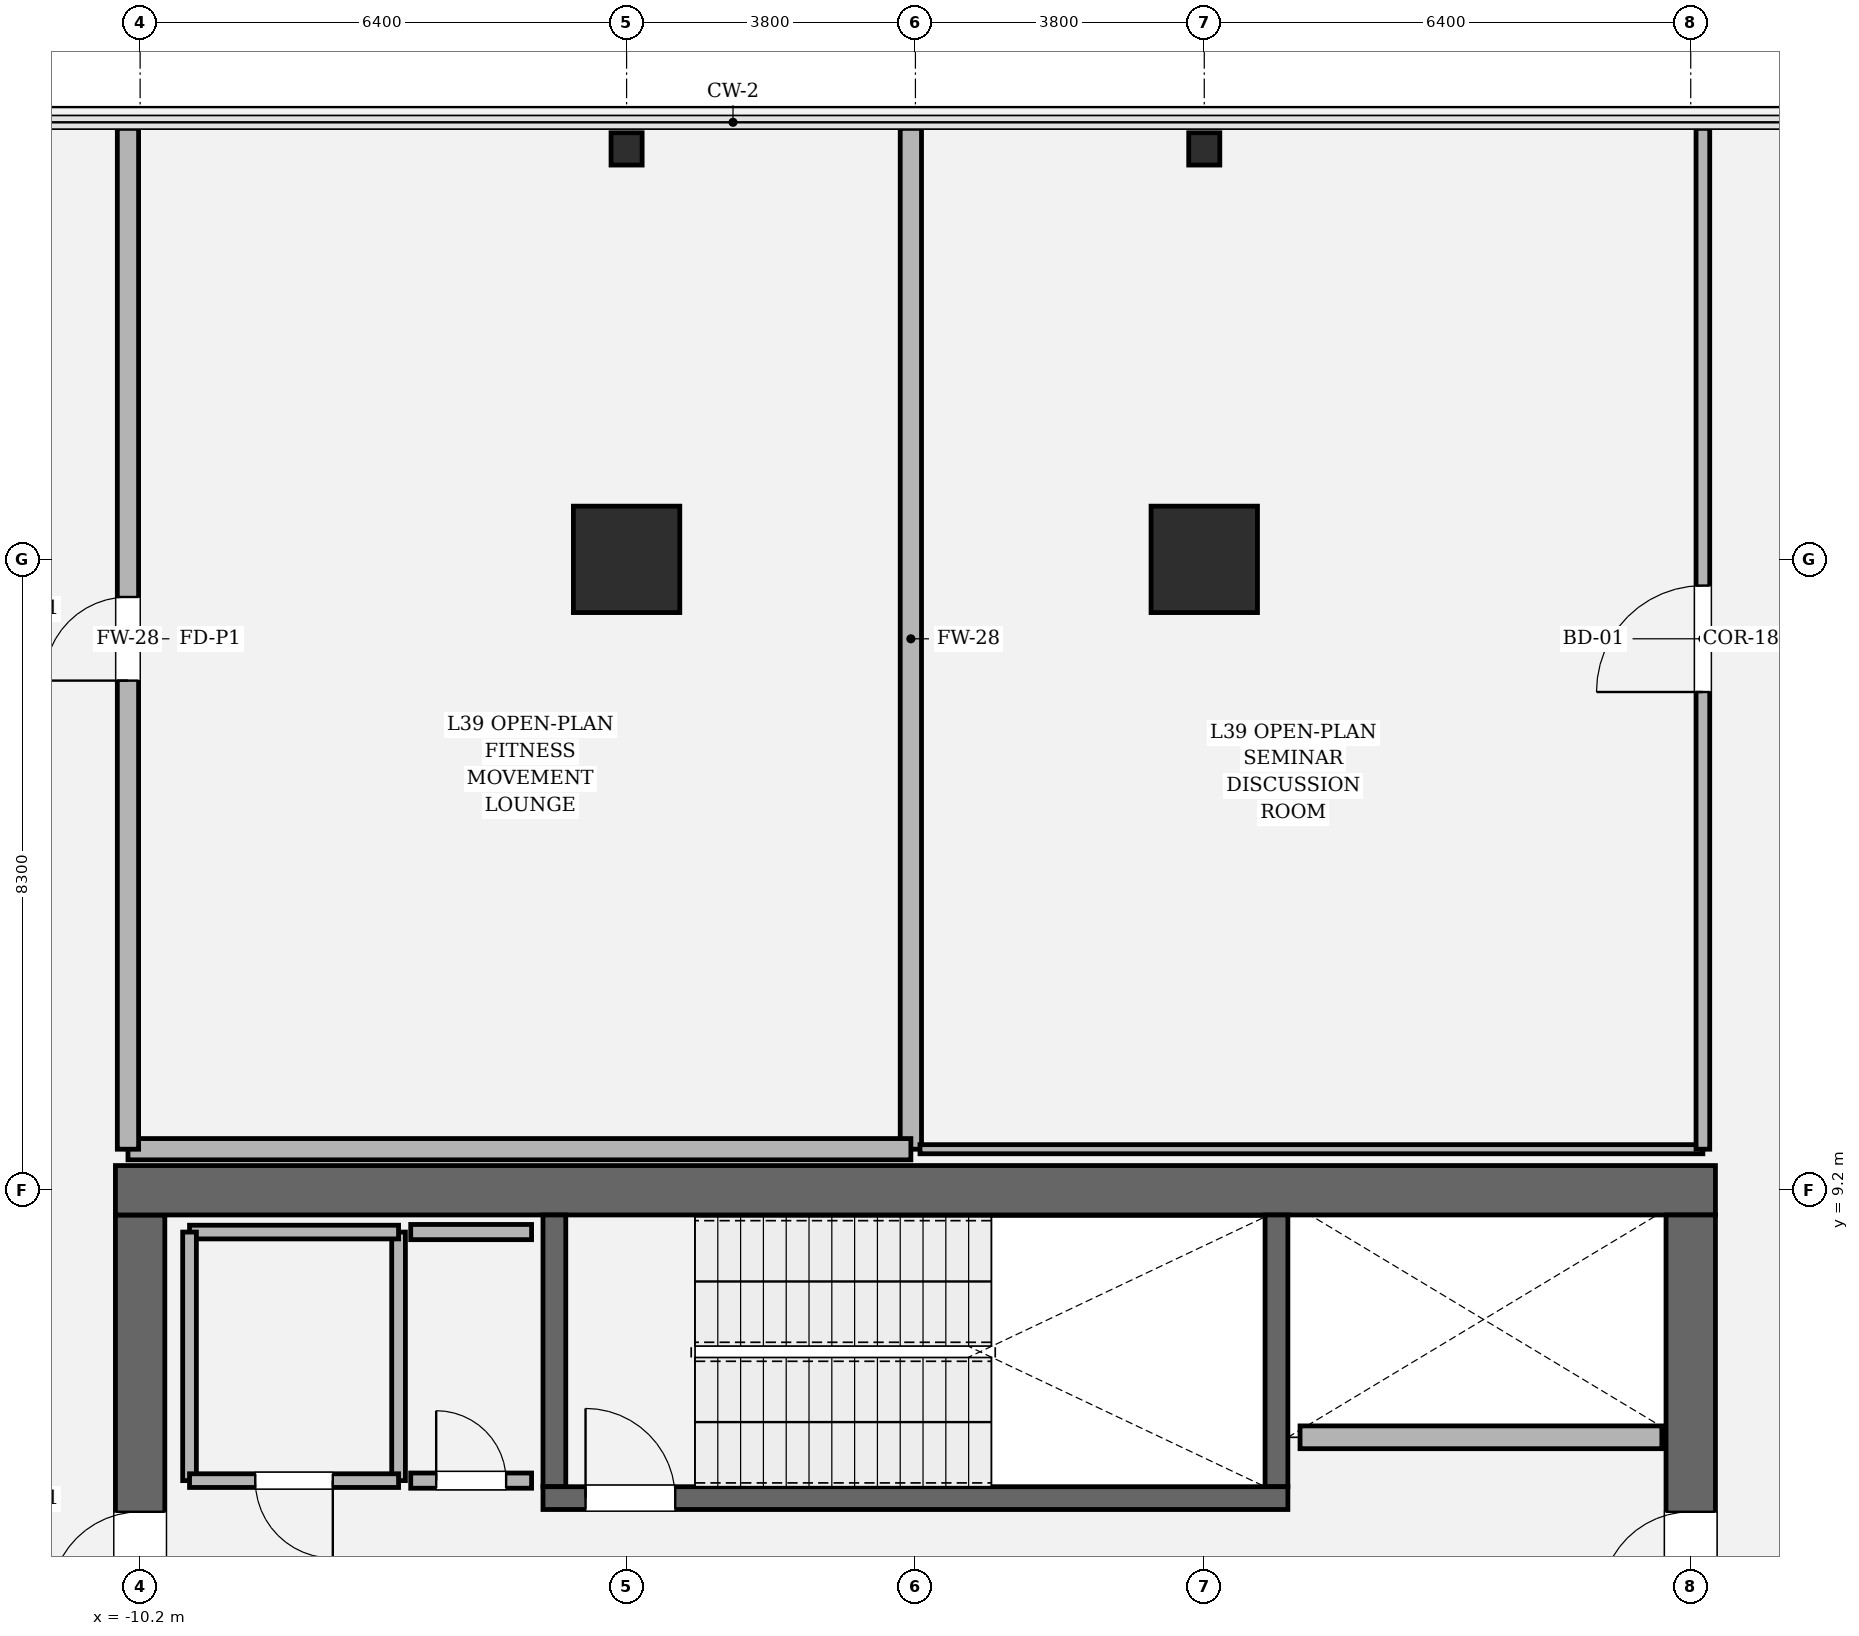
"""IFC4 building model, lengths in metres.
Left out: names, types, materials, properties, quantities, classifications, styles, units other than length and angle.
Written with IfcOpenShell. Run it as: python <this file> out.ifc"""

import sys

from ifc_helpers import new_model, si_unit, direction, frame, frame_2d, origin, origin_2d, place, context, subcontext, project, spatial, rectangle, hollow_rectangle, i_section, extrude, element, fill, save


model = new_model("IFC4")
c1 = context("Model", 3, precision=1e-05, world=origin(), true_north=direction((0.0, 1.0)))
c2 = subcontext(c1, "Body", "Model", "MODEL_VIEW")
j1 = project(units=[si_unit("LENGTHUNIT", "METRE"), si_unit("PLANEANGLEUNIT", "RADIAN")], contexts=[c1])
p1 = place(None, origin())
s1 = spatial("IfcSite", under=j1, at=p1, CompositionType="ELEMENT")
p2 = place(p1, origin())
s2 = spatial("IfcBuilding", under=s1, at=p2, CompositionType="ELEMENT")
p3 = place(p2, frame((0.0, 0.0, 168.15)))
s3 = spatial("IfcBuildingStorey", under=s2, at=p3, CompositionType="ELEMENT", Elevation=168.15)
p4 = place(p3, frame((-10.2, -8.875, 0.0), z_axis=(0.0, 0.0, 1.0), x_axis=(0.0, 1.0, 0.0)))
e1 = element("IfcWall", 1, at=p4, inside=s3, PredefinedType="SHEAR", context=c2, shape_type="SweptSolid", body=[
    extrude(rectangle(XDim=17.75, YDim=0.65, at=frame_2d((8.875, 0.0))), origin(), (0.0, 0.0, 1.0), 4.05),
])
p5 = place(p4, frame((12.665, 0.0, 0.0)))
e2 = element("IfcOpeningElement", 2, at=p5, cuts=e1, PredefinedType="OPENING", context=c2, shape_type="SweptSolid", body=[
    extrude(rectangle(XDim=1.18, YDim=2.2, at=frame_2d((0.59, 1.1))), frame((0.0, 0.335, 0.0), z_axis=(0.0, -1.0, 0.0), x_axis=(1.0, 0.0, 0.0)), (0.0, 0.0, 1.0), 0.67),
])
p6 = place(p3, frame((-10.525, 9.2, 0.0), z_axis=(0.0, 0.0, 1.0), x_axis=(1.0, 0.0, 0.0)))
e3 = element("IfcWall", 3, at=p6, inside=s3, PredefinedType="SHEAR", context=c2, shape_type="SweptSolid", body=[
    extrude(rectangle(XDim=21.05, YDim=0.65, at=frame_2d((10.525, 0.0))), origin(), (0.0, 0.0, 1.0), 4.05),
])
p7 = place(p3, frame((10.2, 8.875, 0.0), z_axis=(0.0, 0.0, 1.0), x_axis=(0.0, -1.0, 0.0)))
e4 = element("IfcWall", 4, at=p7, inside=s3, PredefinedType="SHEAR", context=c2, shape_type="SweptSolid", body=[
    extrude(rectangle(XDim=17.75, YDim=0.65, at=frame_2d((8.875, 0.0))), origin(), (0.0, 0.0, 1.0), 4.05),
])
p8 = place(p7, frame((3.905, 0.0, 0.0)))
e5 = element("IfcOpeningElement", 5, at=p8, cuts=e4, PredefinedType="OPENING", context=c2, shape_type="SweptSolid", body=[
    extrude(rectangle(XDim=1.18, YDim=2.2, at=frame_2d((0.59, 1.1))), frame((0.0, 0.335, 0.0), z_axis=(0.0, -1.0, 0.0), x_axis=(1.0, 0.0, 0.0)), (0.0, 0.0, 1.0), 0.67),
])
for number, where, z_axis, x_axis in (
    (6, (-4.75, 5.3, 0.0), (0.0, 0.0, 1.0), (0.0, 1.0, 0.0)),
    (7, (4.75, 8.875, 0.0), (0.0, 0.0, 1.0), (0.0, -1.0, 0.0)),
):
    element("IfcWall", number, at=place(p3, frame(where, z_axis=z_axis, x_axis=x_axis)), inside=s3, PredefinedType="SOLIDWALL", context=c2, shape_type="SweptSolid", body=[
        extrude(rectangle(XDim=3.575, YDim=0.3, at=frame_2d((1.788, 0.0))), origin(), (0.0, 0.0, 1.0), 4.05),
    ])
p9 = place(p3, frame((-4.9, 5.15, 0.0), z_axis=(0.0, 0.0, 1.0), x_axis=(1.0, 0.0, 0.0)))
e8 = element("IfcWall", 8, at=p9, inside=s3, PredefinedType="SOLIDWALL", context=c2, shape_type="SweptSolid", body=[
    extrude(rectangle(XDim=9.8, YDim=0.3, at=frame_2d((4.9, 0.0))), origin(), (0.0, 0.0, 1.0), 4.05),
])
p10 = place(p9, frame((0.56, 0.0, 0.0)))
e9 = element("IfcOpeningElement", 9, at=p10, cuts=e8, PredefinedType="OPENING", context=c2, shape_type="SweptSolid", body=[
    extrude(rectangle(XDim=1.18, YDim=2.2, at=frame_2d((0.59, 1.1))), frame((0.0, 0.16, 0.0), z_axis=(0.0, -1.0, 0.0), x_axis=(1.0, 0.0, 0.0)), (0.0, 0.0, 1.0), 0.32),
])
for number, where, z_axis, x_axis in (
    (10, (3.8, 17.5, 0.0), (0.0, 0.0, 1.0), (1.0, 0.0, 0.0)),
    (11, (-3.8, 17.5, 0.0), (0.0, 0.0, 1.0), (1.0, 0.0, 0.0)),
):
    element("IfcColumn", number, at=place(p3, frame(where, z_axis=z_axis, x_axis=x_axis)), inside=s3, PredefinedType="COLUMN", context=c2, shape_type="SweptSolid", body=[
        extrude(hollow_rectangle(XDim=1.4, YDim=1.4, WallThickness=0.042, at=origin_2d()), origin(), (0.0, 0.0, 1.0), 4.05),
    ])
for number, where, z_axis, x_axis in (
    (12, (-3.8, 22.9, 0.0), (0.0, 0.0, 1.0), (1.0, 0.0, 0.0)),
    (13, (3.8, 22.9, 0.0), (0.0, 0.0, 1.0), (1.0, 0.0, 0.0)),
):
    element("IfcColumn", number, at=place(p3, frame(where, z_axis=z_axis, x_axis=x_axis)), inside=s3, PredefinedType="COLUMN", context=c2, shape_type="SweptSolid", body=[
        extrude(i_section(OverallWidth=0.409, OverallDepth=0.425, WebThickness=0.032, FlangeThickness=0.052, FilletRadius=0.018, at=origin_2d()), origin(), (0.0, 0.0, 1.0), 4.048),
    ])
p11 = place(p3, frame((5.06, 5.95, 0.0), z_axis=(0.0, 0.0, 1.0), x_axis=(1.0, 0.0, 0.0)))
e14 = element("IfcWall", 14, at=p11, inside=s3, PredefinedType="SOLIDWALL", context=c2, shape_type="SweptSolid", body=[
    extrude(rectangle(XDim=4.76, YDim=0.3, at=frame_2d((2.38, 0.0))), origin(), (0.0, 0.0, 1.0), 3.77),
])
p12 = place(p3, frame((-6.8, 5.38, 0.0), z_axis=(0.0, 0.0, 1.0), x_axis=(0.0, 1.0, 0.0)))
e15 = element("IfcWall", 15, at=p12, inside=s3, PredefinedType="PARTITIONING", context=c2, shape_type="SweptSolid", body=[
    extrude(rectangle(XDim=3.27, YDim=0.18, at=frame_2d((1.635, 0.0))), origin(), (0.0, 0.0, 1.0), 3.77),
])
p13 = place(p3, frame((-6.8, 8.65, 0.0), z_axis=(0.0, 0.0, 1.0), x_axis=(-1.0, 0.0, 0.0)))
e16 = element("IfcWall", 16, at=p13, inside=s3, PredefinedType="PARTITIONING", context=c2, shape_type="SweptSolid", body=[
    extrude(rectangle(XDim=2.75, YDim=0.18, at=frame_2d((1.375, 0.0))), origin(), (0.0, 0.0, 1.0), 3.77),
])
p14 = place(p3, frame((-9.55, 8.65, 0.0), z_axis=(0.0, 0.0, 1.0), x_axis=(0.0, -1.0, 0.0)))
e17 = element("IfcWall", 17, at=p14, inside=s3, PredefinedType="PARTITIONING", context=c2, shape_type="SweptSolid", body=[
    extrude(rectangle(XDim=3.27, YDim=0.18, at=frame_2d((1.635, 0.0))), origin(), (0.0, 0.0, 1.0), 3.77),
])
p15 = place(p3, frame((-9.55, 5.38, 0.0), z_axis=(0.0, 0.0, 1.0), x_axis=(1.0, 0.0, 0.0)))
e18 = element("IfcWall", 18, at=p15, inside=s3, PredefinedType="PARTITIONING", context=c2, shape_type="SweptSolid", body=[
    extrude(rectangle(XDim=2.75, YDim=0.18, at=frame_2d((1.375, 0.0))), origin(), (0.0, 0.0, 1.0), 3.77),
])
p16 = place(p15, frame((0.865, 0.0, 0.0)))
e19 = element("IfcOpeningElement", 19, at=p16, cuts=e18, PredefinedType="OPENING", context=c2, shape_type="SweptSolid", body=[
    extrude(rectangle(XDim=1.02, YDim=2.2, at=frame_2d((0.51, 1.1))), frame((0.0, 0.1, 0.0), z_axis=(0.0, -1.0, 0.0), x_axis=(1.0, 0.0, 0.0)), (0.0, 0.0, 1.0), 0.2),
])
p17 = place(p3, frame((-5.05, 8.65, 0.0), z_axis=(0.0, 0.0, 1.0), x_axis=(-1.0, 0.0, 0.0)))
e20 = element("IfcWall", 20, at=p17, inside=s3, PredefinedType="SOLIDWALL", context=c2, shape_type="SweptSolid", body=[
    extrude(rectangle(XDim=1.59, YDim=0.2, at=frame_2d((0.795, 0.0))), origin(), (0.0, 0.0, 1.0), 3.77),
])
p18 = place(p3, frame((-6.64, 5.38, 0.0), z_axis=(0.0, 0.0, 1.0), x_axis=(1.0, 0.0, 0.0)))
e21 = element("IfcWall", 21, at=p18, inside=s3, PredefinedType="SOLIDWALL", context=c2, shape_type="SweptSolid", body=[
    extrude(rectangle(XDim=1.59, YDim=0.2, at=frame_2d((0.795, 0.0))), origin(), (0.0, 0.0, 1.0), 3.77),
])
p19 = place(p18, frame((0.335, 0.0, 0.0)))
e22 = element("IfcOpeningElement", 22, at=p19, cuts=e21, PredefinedType="OPENING", context=c2, shape_type="SweptSolid", body=[
    extrude(rectangle(XDim=0.92, YDim=2.1, at=frame_2d((0.46, 1.05))), frame((0.0, 0.11, 0.0), z_axis=(0.0, -1.0, 0.0), x_axis=(1.0, 0.0, 0.0)), (0.0, 0.0, 1.0), 0.22),
])
p20 = place(p3, frame((-0.06, 23.17, 0.0), z_axis=(0.0, 0.0, 1.0), x_axis=(0.0, -1.0, 0.0)))
e23 = element("IfcWall", 23, at=p20, inside=s3, PredefinedType="SOLIDWALL", context=c2, shape_type="SweptSolid", body=[
    extrude(rectangle(XDim=13.43, YDim=0.28, at=frame_2d((6.715, 0.0))), origin(), (0.0, 0.0, 1.0), 2.444),
])
p21 = place(p3, frame((-0.06, 9.74, 0.0), z_axis=(0.0, 0.0, 1.0), x_axis=(-1.0, 0.0, 0.0)))
e24 = element("IfcWall", 24, at=p21, inside=s3, PredefinedType="SOLIDWALL", context=c2, shape_type="SweptSolid", body=[
    extrude(rectangle(XDim=10.3, YDim=0.28, at=frame_2d((5.15, 0.0))), origin(), (0.0, 0.0, 1.0), 2.444),
])
p22 = place(p3, frame((-10.36, 9.74, 0.0), z_axis=(0.0, 0.0, 1.0), x_axis=(0.0, 1.0, 0.0)))
e25 = element("IfcWall", 25, at=p22, inside=s3, PredefinedType="SOLIDWALL", context=c2, shape_type="SweptSolid", body=[
    extrude(rectangle(XDim=13.43, YDim=0.28, at=frame_2d((6.715, 0.0))), origin(), (0.0, 0.0, 1.0), 2.444),
])
p23 = place(p22, frame((6.165, 0.0, 0.0)))
e26 = element("IfcOpeningElement", 26, at=p23, cuts=e25, PredefinedType="OPENING", context=c2, shape_type="SweptSolid", body=[
    extrude(rectangle(XDim=1.1, YDim=2.2, at=frame_2d((0.55, 1.1))), frame((0.0, 0.15, 0.0), z_axis=(0.0, -1.0, 0.0), x_axis=(1.0, 0.0, 0.0)), (0.0, 0.0, 1.0), 0.3),
])
p24 = place(p3, frame((10.36, 9.74, 0.0), z_axis=(0.0, 0.0, 1.0), x_axis=(-1.0, 0.0, 0.0)))
e27 = element("IfcWall", 27, at=p24, inside=s3, PredefinedType="PARTITIONING", context=c2, shape_type="SweptSolid", body=[
    extrude(rectangle(XDim=10.3, YDim=0.12, at=frame_2d((5.15, 0.0))), origin(), (0.0, 0.0, 1.0), 2.444),
])
p25 = place(p3, frame((10.36, 23.17, 0.0), z_axis=(0.0, 0.0, 1.0), x_axis=(0.0, -1.0, 0.0)))
e28 = element("IfcWall", 28, at=p25, inside=s3, PredefinedType="PARTITIONING", context=c2, shape_type="SweptSolid", body=[
    extrude(rectangle(XDim=13.43, YDim=0.18, at=frame_2d((6.715, 0.0))), origin(), (0.0, 0.0, 1.0), 2.444),
])
p26 = place(p25, frame((6.015, 0.0, 0.0)))
e29 = element("IfcOpeningElement", 29, at=p26, cuts=e28, PredefinedType="OPENING", context=c2, shape_type="SweptSolid", body=[
    extrude(rectangle(XDim=1.4, YDim=2.25, at=frame_2d((0.7, 1.125))), frame((0.0, 0.1, 0.0), z_axis=(0.0, -1.0, 0.0), x_axis=(1.0, 0.0, 0.0)), (0.0, 0.0, 1.0), 0.2),
])
p27 = place(p10, origin())
e30 = element("IfcDoor", 30, at=p27, inside=s3, OperationType="SINGLE_SWING_LEFT", PredefinedType="DOOR", context=c2, shape_type="SweptSolid", body=[
    extrude(rectangle(XDim=1.18, YDim=2.2, at=frame_2d((0.59, 1.1))), frame((0.0, 0.025, 0.0), z_axis=(0.0, -1.0, 0.0), x_axis=(1.0, 0.0, 0.0)), (0.0, 0.0, 1.0), 0.05),
])
fill(e9, e30)
p28 = place(p5, origin())
e31 = element("IfcDoor", 31, at=p28, inside=s3, OperationType="SINGLE_SWING_LEFT", PredefinedType="DOOR", context=c2, shape_type="SweptSolid", body=[
    extrude(rectangle(XDim=1.18, YDim=2.2, at=frame_2d((0.59, 1.1))), frame((0.0, 0.025, 0.0), z_axis=(0.0, -1.0, 0.0), x_axis=(1.0, 0.0, 0.0)), (0.0, 0.0, 1.0), 0.05),
])
fill(e2, e31)
p29 = place(p8, origin())
e32 = element("IfcDoor", 32, at=p29, inside=s3, OperationType="SINGLE_SWING_RIGHT", PredefinedType="DOOR", context=c2, shape_type="SweptSolid", body=[
    extrude(rectangle(XDim=1.18, YDim=2.2, at=frame_2d((0.59, 1.1))), frame((0.0, 0.025, 0.0), z_axis=(0.0, -1.0, 0.0), x_axis=(1.0, 0.0, 0.0)), (0.0, 0.0, 1.0), 0.05),
])
fill(e5, e32)
p30 = place(p16, origin())
e33 = element("IfcDoor", 33, at=p30, inside=s3, OperationType="SINGLE_SWING_RIGHT", PredefinedType="DOOR", context=c2, shape_type="SweptSolid", body=[
    extrude(rectangle(XDim=1.02, YDim=2.2, at=frame_2d((0.51, 1.1))), frame((0.0, 0.025, 0.0), z_axis=(0.0, -1.0, 0.0), x_axis=(1.0, 0.0, 0.0)), (0.0, 0.0, 1.0), 0.05),
])
fill(e19, e33)
p31 = place(p19, origin())
e34 = element("IfcDoor", 34, at=p31, inside=s3, OperationType="SINGLE_SWING_LEFT", PredefinedType="DOOR", context=c2, shape_type="SweptSolid", body=[
    extrude(rectangle(XDim=0.92, YDim=2.1, at=frame_2d((0.46, 1.05))), frame((0.0, 0.025, 0.0), z_axis=(0.0, -1.0, 0.0), x_axis=(1.0, 0.0, 0.0)), (0.0, 0.0, 1.0), 0.05),
])
fill(e22, e34)
p32 = place(p23, origin())
e35 = element("IfcDoor", 35, at=p32, inside=s3, OperationType="SINGLE_SWING_LEFT", PredefinedType="DOOR", context=c2, shape_type="SweptSolid", body=[
    extrude(rectangle(XDim=1.1, YDim=2.2, at=frame_2d((0.55, 1.1))), frame((0.0, 0.025, 0.0), z_axis=(0.0, -1.0, 0.0), x_axis=(1.0, 0.0, 0.0)), (0.0, 0.0, 1.0), 0.05),
])
fill(e26, e35)
p33 = place(p26, origin())
e36 = element("IfcDoor", 36, at=p33, inside=s3, OperationType="SINGLE_SWING_RIGHT", PredefinedType="DOOR", context=c2, shape_type="SweptSolid", body=[
    extrude(rectangle(XDim=1.4, YDim=2.25, at=frame_2d((0.7, 1.125))), frame((0.0, 0.025, 0.0), z_axis=(0.0, -1.0, 0.0), x_axis=(1.0, 0.0, 0.0)), (0.0, 0.0, 1.0), 0.05),
])
fill(e29, e36)
save(model, sys.argv[1])
